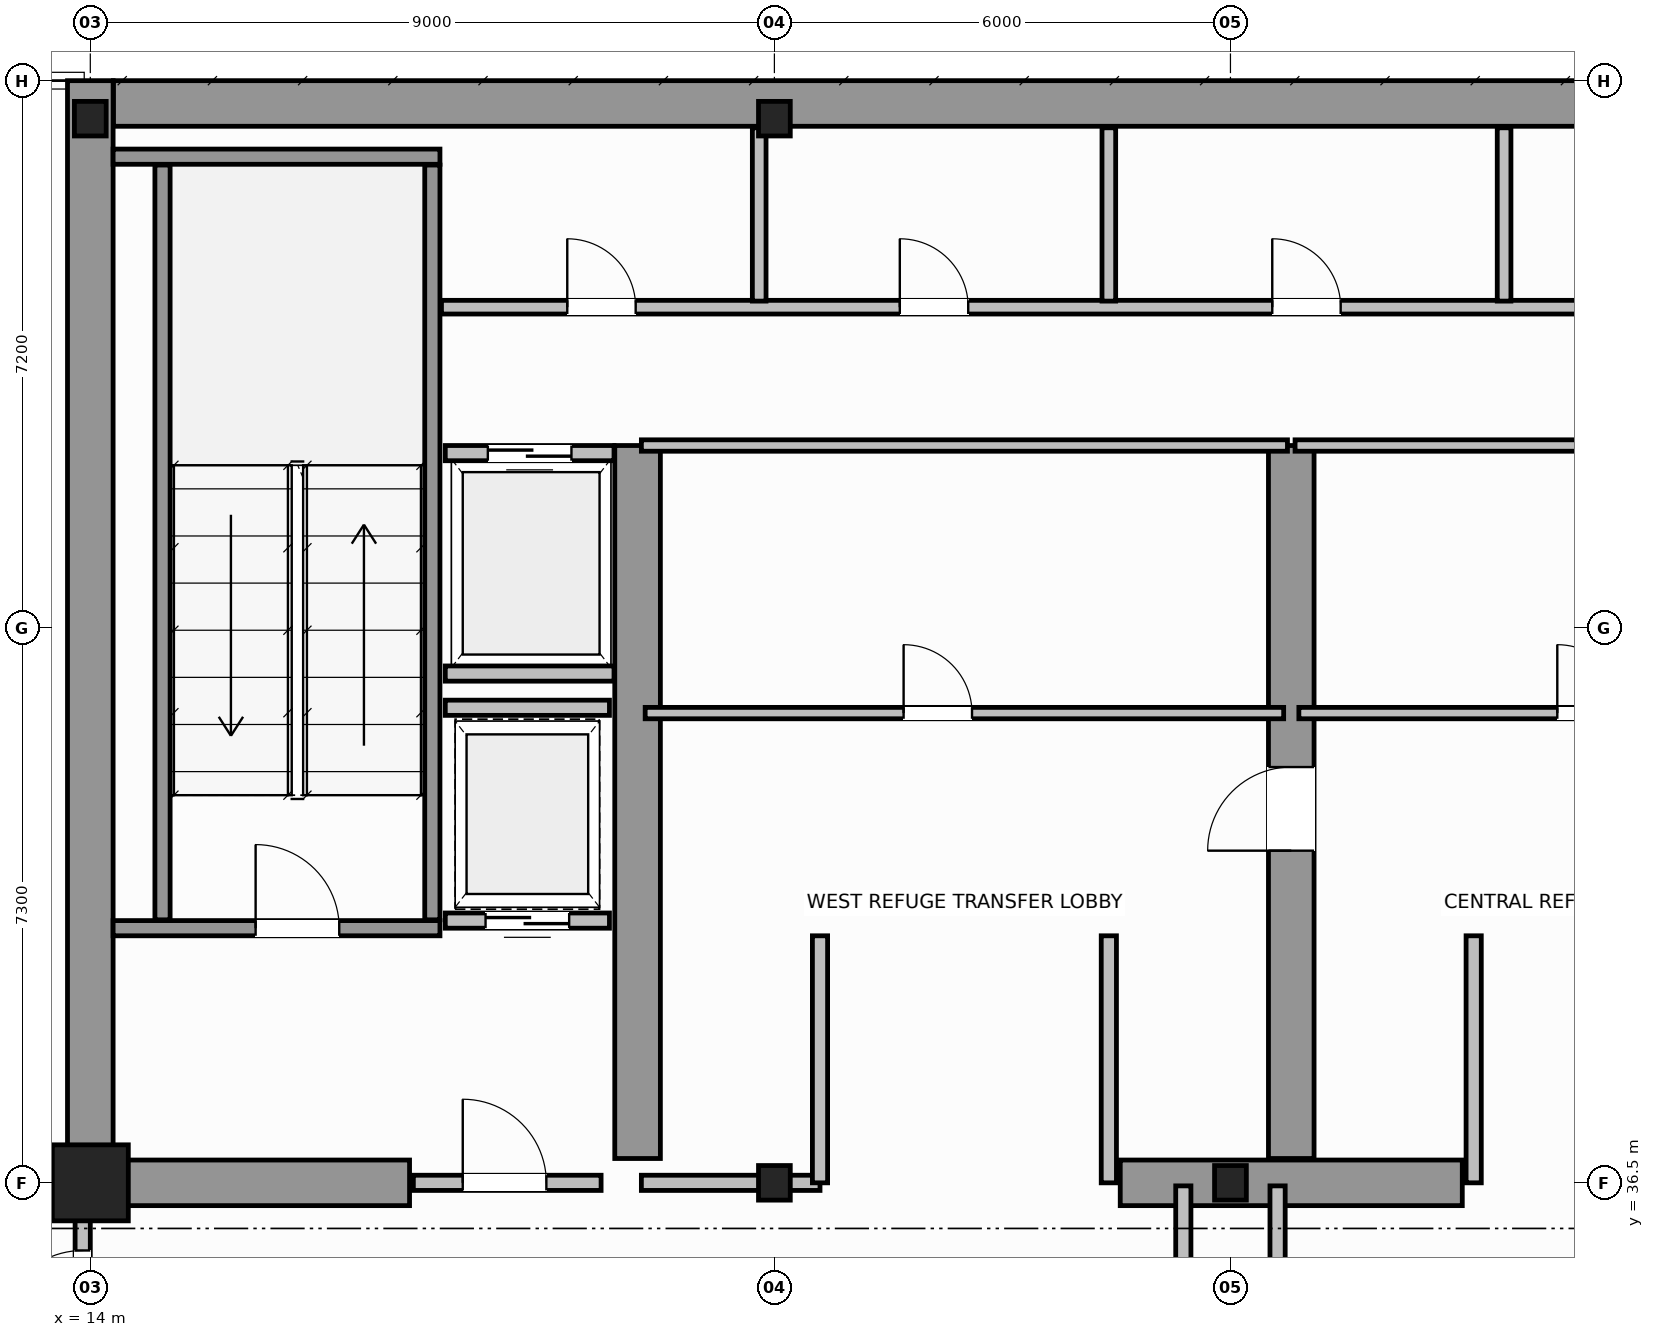
"""IFC4 building model, lengths in metres.
Left out: names, types, materials, properties, quantities, classifications, styles, units other than length and angle.
Written with IfcOpenShell. Run it as: python <this file> out.ifc"""

import sys

from ifc_helpers import new_model, si_unit, direction, frame, frame_2d, origin, origin_2d, place, context, subcontext, project, spatial, rectangle, i_section, extrude, source, transform, mapped, element, fill, save


model = new_model("IFC4")
c1 = context("Model", 3, precision=1e-05, world=origin(), true_north=direction((0.0, 1.0)))
c2 = subcontext(c1, "Body", "Model", "MODEL_VIEW")
j1 = project(units=[si_unit("LENGTHUNIT", "METRE"), si_unit("PLANEANGLEUNIT", "RADIAN")], contexts=[c1])
p1 = place(None, origin())
s1 = spatial("IfcSite", under=j1, at=p1, CompositionType="ELEMENT")
p2 = place(p1, origin())
s2 = spatial("IfcBuilding", under=s1, at=p2, CompositionType="ELEMENT")
p3 = place(p2, frame((0.0, 0.0, 218.4)))
s3 = spatial("IfcBuildingStorey", under=s2, at=p3, CompositionType="ELEMENT", Elevation=218.4)
m1 = source(origin(), c2, "Body", "SweptSolid", [
    extrude(rectangle(XDim=1.0, YDim=1.0, at=origin_2d()), origin(), (0.0, 0.0, 1.0), 4.8),
])
p4 = place(p3, frame((14.0, 36.5, 0.0), z_axis=(0.0, 0.0, 1.0), x_axis=(1.0, 0.0, 0.0)))
e1 = element("IfcColumn", 1, at=p4, inside=s3, PredefinedType="COLUMN", context=c2, shape_type="MappedRepresentation", body=[
    mapped(m1, transform((0.0, 0.0, 0.0), scale=1.0)),
])
m2 = source(origin(), c2, "Body", "SweptSolid", [
    extrude(i_section(OverallWidth=0.418, OverallDepth=0.455, WebThickness=0.042, FlangeThickness=0.058, FilletRadius=0.015, at=origin_2d()), origin(), (0.0, 0.0, 1.0), 4.8),
])
for number, where, z_axis, x_axis in (
    (2, (23.0, 36.5, 0.0), (0.0, 0.0, 1.0), (1.0, 0.0, 0.0)),
    (3, (29.0, 36.5, 0.0), (0.0, 0.0, 1.0), (1.0, 0.0, 0.0)),
    (4, (14.0, 50.5, 0.0), (0.0, 0.0, 1.0), (1.0, 0.0, 0.0)),
    (5, (23.0, 50.5, 0.0), (0.0, 0.0, 1.0), (1.0, 0.0, 0.0)),
):
    element("IfcColumn", number, at=place(p3, frame(where, z_axis=z_axis, x_axis=x_axis)), inside=s3, PredefinedType="COLUMN", context=c2, shape_type="MappedRepresentation", body=[
        mapped(m2, transform((0.0, 0.0, 0.0), scale=1.0)),
    ])
p5 = place(p3, frame((14.304, 50.7, 0.0), z_axis=(0.0, 0.0, 1.0), x_axis=(1.0, 0.0, 0.0)))
e6 = element("IfcWall", 6, at=p5, inside=s3, PredefinedType="SHEAR", context=c2, shape_type="SweptSolid", body=[
    extrude(rectangle(XDim=19.694, YDim=0.6, at=frame_2d((9.847, 0.0))), origin(), (0.0, 0.0, 1.0), 4.8),
])
p6 = place(p3, frame((14.0, 36.5, 0.0), z_axis=(0.0, 0.0, 1.0), x_axis=(0.0, 1.0, 0.0)))
e7 = element("IfcWall", 7, at=p6, inside=s3, PredefinedType="SHEAR", context=c2, shape_type="SweptSolid", body=[
    extrude(rectangle(XDim=14.5, YDim=0.6, at=frame_2d((7.25, 0.0))), origin(), (0.0, 0.0, 1.0), 4.8),
])
p7 = place(p3, frame((14.32, 36.5, 0.0), z_axis=(0.0, 0.0, 1.0), x_axis=(1.0, 0.0, 0.0)))
e8 = element("IfcWall", 8, at=p7, inside=s3, PredefinedType="SHEAR", context=c2, shape_type="SweptSolid", body=[
    extrude(rectangle(XDim=3.88, YDim=0.6, at=frame_2d((1.94, 0.0))), origin(), (0.0, 0.0, 1.0), 3.54),
])
p8 = place(p3, frame((27.55, 36.5, 0.0), z_axis=(0.0, 0.0, 1.0), x_axis=(1.0, 0.0, 0.0)))
e9 = element("IfcWall", 9, at=p8, inside=s3, PredefinedType="SHEAR", context=c2, shape_type="SweptSolid", body=[
    extrude(rectangle(XDim=4.5, YDim=0.6, at=frame_2d((2.25, 0.0))), origin(), (0.0, 0.0, 1.0), 4.8),
])
p9 = place(p3, frame((21.2, 36.82, 0.0), z_axis=(0.0, 0.0, 1.0), x_axis=(0.0, 1.0, 0.0)))
e10 = element("IfcWall", 10, at=p9, inside=s3, PredefinedType="SHEAR", context=c2, shape_type="SweptSolid", body=[
    extrude(rectangle(XDim=9.38, YDim=0.6, at=frame_2d((4.69, 0.0))), origin(), (0.0, 0.0, 1.0), 4.8),
])
p10 = place(p3, frame((29.8, 36.82, 0.0), z_axis=(0.0, 0.0, 1.0), x_axis=(0.0, 1.0, 0.0)))
e11 = element("IfcWall", 11, at=p10, inside=s3, PredefinedType="SHEAR", context=c2, shape_type="SweptSolid", body=[
    extrude(rectangle(XDim=9.38, YDim=0.6, at=frame_2d((4.69, 0.0))), origin(), (0.0, 0.0, 1.0), 4.8),
])
p11 = place(p10, frame((4.05, 0.0, 0.0)))
e12 = element("IfcOpeningElement", 12, at=p11, cuts=e11, PredefinedType="OPENING", context=c2, shape_type="SweptSolid", body=[
    extrude(rectangle(XDim=1.1, YDim=2.15, at=frame_2d((0.55, 1.075))), frame((0.0, 0.31, 0.0), z_axis=(0.0, -1.0, 0.0), x_axis=(1.0, 0.0, 0.0)), (0.0, 0.0, 1.0), 0.62),
])
p12 = place(p3, frame((14.3, 39.85, 0.0), z_axis=(0.0, 0.0, 1.0), x_axis=(1.0, 0.0, 0.0)))
e13 = element("IfcWall", 13, at=p12, inside=s3, PredefinedType="SOLIDWALL", context=c2, shape_type="SweptSolid", body=[
    extrude(rectangle(XDim=4.3, YDim=0.2, at=frame_2d((2.15, 0.0))), origin(), (0.0, 0.0, 1.0), 4.8),
])
p13 = place(p12, frame((1.875, 0.0, 0.0)))
e14 = element("IfcOpeningElement", 14, at=p13, cuts=e13, PredefinedType="OPENING", context=c2, shape_type="SweptSolid", body=[
    extrude(rectangle(XDim=1.1, YDim=2.15, at=frame_2d((0.55, 1.075))), frame((0.0, 0.11, 0.0), z_axis=(0.0, -1.0, 0.0), x_axis=(1.0, 0.0, 0.0)), (0.0, 0.0, 1.0), 0.22),
])
p14 = place(p3, frame((14.3, 50.0, 0.0), z_axis=(0.0, 0.0, 1.0), x_axis=(1.0, 0.0, 0.0)))
e15 = element("IfcWall", 15, at=p14, inside=s3, PredefinedType="SOLIDWALL", context=c2, shape_type="SweptSolid", body=[
    extrude(rectangle(XDim=4.3, YDim=0.2, at=frame_2d((2.15, 0.0))), origin(), (0.0, 0.0, 1.0), 4.8),
])
for number, where, z_axis, x_axis in (
    (16, (14.95, 39.96, 0.0), (0.0, 0.0, 1.0), (0.0, 1.0, 0.0)),
    (17, (18.5, 39.96, 0.0), (0.0, 0.0, 1.0), (0.0, 1.0, 0.0)),
):
    element("IfcWall", number, at=place(p3, frame(where, z_axis=z_axis, x_axis=x_axis)), inside=s3, PredefinedType="SOLIDWALL", context=c2, shape_type="SweptSolid", body=[
        extrude(rectangle(XDim=9.93, YDim=0.2, at=frame_2d((4.965, 0.0))), origin(), (0.0, 0.0, 1.0), 4.8),
    ])
p15 = place(p3, frame((18.25, 36.5, 0.0), z_axis=(0.0, 0.0, 1.0), x_axis=(1.0, 0.0, 0.0)))
e18 = element("IfcWall", 18, at=p15, inside=s3, PredefinedType="SOLIDWALL", context=c2, shape_type="SweptSolid", body=[
    extrude(rectangle(XDim=2.47, YDim=0.2, at=frame_2d((1.235, 0.0))), origin(), (0.0, 0.0, 1.0), 3.53),
])
p16 = place(p15, frame((0.65, 0.0, 0.0)))
e19 = element("IfcOpeningElement", 19, at=p16, cuts=e18, PredefinedType="OPENING", context=c2, shape_type="SweptSolid", body=[
    extrude(rectangle(XDim=1.1, YDim=2.15, at=frame_2d((0.55, 1.075))), frame((0.0, 0.11, 0.0), z_axis=(0.0, -1.0, 0.0), x_axis=(1.0, 0.0, 0.0)), (0.0, 0.0, 1.0), 0.22),
])
p17 = place(p3, frame((18.67, 46.1, 0.0), z_axis=(0.0, 0.0, 1.0), x_axis=(1.0, 0.0, 0.0)))
e20 = element("IfcWall", 20, at=p17, inside=s3, PredefinedType="SOLIDWALL", context=c2, shape_type="SweptSolid", body=[
    extrude(rectangle(XDim=2.22, YDim=0.2, at=frame_2d((1.11, 0.0))), origin(), (0.0, 0.0, 1.0), 4.54),
])
p18 = place(p17, frame((0.56, 0.0, 0.0)))
e21 = element("IfcOpeningElement", 21, at=p18, cuts=e20, PredefinedType="OPENING", context=c2, shape_type="SweptSolid", body=[
    extrude(rectangle(XDim=1.1, YDim=2.15, at=frame_2d((0.55, 1.075))), frame((0.0, 0.11, 0.0), z_axis=(0.0, -1.0, 0.0), x_axis=(1.0, 0.0, 0.0)), (0.0, 0.0, 1.0), 0.22),
])
p19 = place(p3, frame((18.67, 43.2, 0.0), z_axis=(0.0, 0.0, 1.0), x_axis=(1.0, 0.0, 0.0)))
e22 = element("IfcWall", 22, at=p19, inside=s3, PredefinedType="SOLIDWALL", context=c2, shape_type="SweptSolid", body=[
    extrude(rectangle(XDim=2.22, YDim=0.2, at=frame_2d((1.11, 0.0))), origin(), (0.0, 0.0, 1.0), 4.54),
])
p20 = place(p3, frame((18.67, 39.95, 0.0), z_axis=(0.0, 0.0, 1.0), x_axis=(1.0, 0.0, 0.0)))
e23 = element("IfcWall", 23, at=p20, inside=s3, PredefinedType="SOLIDWALL", context=c2, shape_type="SweptSolid", body=[
    extrude(rectangle(XDim=2.16, YDim=0.2, at=frame_2d((1.08, 0.0))), origin(), (0.0, 0.0, 1.0), 4.54),
])
p21 = place(p20, frame((0.53, 0.0, 0.0)))
e24 = element("IfcOpeningElement", 24, at=p21, cuts=e23, PredefinedType="OPENING", context=c2, shape_type="SweptSolid", body=[
    extrude(rectangle(XDim=1.1, YDim=2.15, at=frame_2d((0.55, 1.075))), frame((0.0, 0.11, 0.0), z_axis=(0.0, -1.0, 0.0), x_axis=(1.0, 0.0, 0.0)), (0.0, 0.0, 1.0), 0.22),
])
p22 = place(p3, frame((18.67, 42.75, 0.0), z_axis=(0.0, 0.0, 1.0), x_axis=(1.0, 0.0, 0.0)))
e25 = element("IfcWall", 25, at=p22, inside=s3, PredefinedType="SOLIDWALL", context=c2, shape_type="SweptSolid", body=[
    extrude(rectangle(XDim=2.16, YDim=0.2, at=frame_2d((1.08, 0.0))), origin(), (0.0, 0.0, 1.0), 4.54),
])
p23 = place(p3, frame((21.25, 36.5, 0.0), z_axis=(0.0, 0.0, 1.0), x_axis=(1.0, 0.0, 0.0)))
e26 = element("IfcWall", 26, at=p23, inside=s3, PredefinedType="SOLIDWALL", context=c2, shape_type="SweptSolid", body=[
    extrude(rectangle(XDim=2.35, YDim=0.2, at=frame_2d((1.175, 0.0))), origin(), (0.0, 0.0, 1.0), 3.53),
])
for number, where, z_axis, x_axis in (
    (27, (23.6, 36.5, 0.0), (0.0, 0.0, 1.0), (0.0, 1.0, 0.0)),
    (28, (27.4, 36.5, 0.0), (0.0, 0.0, 1.0), (0.0, 1.0, 0.0)),
):
    element("IfcWall", number, at=place(p3, frame(where, z_axis=z_axis, x_axis=x_axis)), inside=s3, PredefinedType="SOLIDWALL", context=c2, shape_type="SweptSolid", body=[
        extrude(rectangle(XDim=3.25, YDim=0.2, at=frame_2d((1.625, 0.0))), origin(), (0.0, 0.0, 1.0), 4.54),
    ])
p24 = place(p3, frame((21.25, 46.2, 0.0), z_axis=(0.0, 0.0, 1.0), x_axis=(1.0, 0.0, 0.0)))
e29 = element("IfcWall", 29, at=p24, inside=s3, PredefinedType="PARTITIONING", context=c2, shape_type="SweptSolid", body=[
    extrude(rectangle(XDim=8.5, YDim=0.15, at=frame_2d((4.25, 0.0))), origin(), (0.0, 0.0, 1.0), 4.54),
])
p25 = place(p3, frame((21.3, 42.68, 0.0), z_axis=(0.0, 0.0, 1.0), x_axis=(1.0, 0.0, 0.0)))
e30 = element("IfcWall", 30, at=p25, inside=s3, PredefinedType="PARTITIONING", context=c2, shape_type="SweptSolid", body=[
    extrude(rectangle(XDim=8.4, YDim=0.15, at=frame_2d((4.2, 0.0))), origin(), (0.0, 0.0, 1.0), 4.54),
])
p26 = place(p25, frame((3.4, 0.0, 0.0)))
e31 = element("IfcOpeningElement", 31, at=p26, cuts=e30, PredefinedType="OPENING", context=c2, shape_type="SweptSolid", body=[
    extrude(rectangle(XDim=0.9, YDim=2.1, at=frame_2d((0.45, 1.05))), frame((0.0, 0.085, 0.0), z_axis=(0.0, -1.0, 0.0), x_axis=(1.0, 0.0, 0.0)), (0.0, 0.0, 1.0), 0.17),
])
p27 = place(p3, frame((32.2, 36.5, 0.0), z_axis=(0.0, 0.0, 1.0), x_axis=(0.0, 1.0, 0.0)))
e32 = element("IfcWall", 32, at=p27, inside=s3, PredefinedType="SOLIDWALL", context=c2, shape_type="SweptSolid", body=[
    extrude(rectangle(XDim=3.25, YDim=0.2, at=frame_2d((1.625, 0.0))), origin(), (0.0, 0.0, 1.0), 4.54),
])
p28 = place(p3, frame((29.85, 46.2, 0.0), z_axis=(0.0, 0.0, 1.0), x_axis=(1.0, 0.0, 0.0)))
e33 = element("IfcWall", 33, at=p28, inside=s3, PredefinedType="PARTITIONING", context=c2, shape_type="SweptSolid", body=[
    extrude(rectangle(XDim=8.5, YDim=0.15, at=frame_2d((4.25, 0.0))), origin(), (0.0, 0.0, 1.0), 4.54),
])
p29 = place(p3, frame((29.9, 42.68, 0.0), z_axis=(0.0, 0.0, 1.0), x_axis=(1.0, 0.0, 0.0)))
e34 = element("IfcWall", 34, at=p29, inside=s3, PredefinedType="PARTITIONING", context=c2, shape_type="SweptSolid", body=[
    extrude(rectangle(XDim=8.4, YDim=0.15, at=frame_2d((4.2, 0.0))), origin(), (0.0, 0.0, 1.0), 4.54),
])
p30 = place(p29, frame((3.4, 0.0, 0.0)))
e35 = element("IfcOpeningElement", 35, at=p30, cuts=e34, PredefinedType="OPENING", context=c2, shape_type="SweptSolid", body=[
    extrude(rectangle(XDim=0.9, YDim=2.1, at=frame_2d((0.45, 1.05))), frame((0.0, 0.085, 0.0), z_axis=(0.0, -1.0, 0.0), x_axis=(1.0, 0.0, 0.0)), (0.0, 0.0, 1.0), 0.17),
])
p31 = place(p3, frame((18.62, 48.02, 0.0), z_axis=(0.0, 0.0, 1.0), x_axis=(1.0, 0.0, 0.0)))
e36 = element("IfcWall", 36, at=p31, inside=s3, PredefinedType="PLUMBINGWALL", context=c2, shape_type="SweptSolid", body=[
    extrude(rectangle(XDim=30.76, YDim=0.18, at=frame_2d((15.38, 0.0))), origin(), (0.0, 0.0, 1.0), 4.54),
])
p32 = place(p31, frame((1.655, 0.0, 0.0)))
e37 = element("IfcOpeningElement", 37, at=p32, cuts=e36, PredefinedType="OPENING", context=c2, shape_type="SweptSolid", body=[
    extrude(rectangle(XDim=0.9, YDim=2.15, at=frame_2d((0.45, 1.075))), frame((0.0, 0.1, 0.0), z_axis=(0.0, -1.0, 0.0), x_axis=(1.0, 0.0, 0.0)), (0.0, 0.0, 1.0), 0.2),
])
p33 = place(p31, frame((6.03, 0.0, 0.0)))
e38 = element("IfcOpeningElement", 38, at=p33, cuts=e36, PredefinedType="OPENING", context=c2, shape_type="SweptSolid", body=[
    extrude(rectangle(XDim=0.9, YDim=2.15, at=frame_2d((0.45, 1.075))), frame((0.0, 0.1, 0.0), z_axis=(0.0, -1.0, 0.0), x_axis=(1.0, 0.0, 0.0)), (0.0, 0.0, 1.0), 0.2),
])
p34 = place(p31, frame((10.93, 0.0, 0.0)))
e39 = element("IfcOpeningElement", 39, at=p34, cuts=e36, PredefinedType="OPENING", context=c2, shape_type="SweptSolid", body=[
    extrude(rectangle(XDim=0.9, YDim=2.15, at=frame_2d((0.45, 1.075))), frame((0.0, 0.1, 0.0), z_axis=(0.0, -1.0, 0.0), x_axis=(1.0, 0.0, 0.0)), (0.0, 0.0, 1.0), 0.2),
])
p35 = place(p31, frame((16.13, 0.0, 0.0)))
e40 = element("IfcOpeningElement", 40, at=p35, cuts=e36, PredefinedType="OPENING", context=c2, shape_type="SweptSolid", body=[
    extrude(rectangle(XDim=0.9, YDim=2.15, at=frame_2d((0.45, 1.075))), frame((0.0, 0.1, 0.0), z_axis=(0.0, -1.0, 0.0), x_axis=(1.0, 0.0, 0.0)), (0.0, 0.0, 1.0), 0.2),
])
p36 = place(p31, frame((21.73, 0.0, 0.0)))
e41 = element("IfcOpeningElement", 41, at=p36, cuts=e36, PredefinedType="OPENING", context=c2, shape_type="SweptSolid", body=[
    extrude(rectangle(XDim=0.9, YDim=2.15, at=frame_2d((0.45, 1.075))), frame((0.0, 0.1, 0.0), z_axis=(0.0, -1.0, 0.0), x_axis=(1.0, 0.0, 0.0)), (0.0, 0.0, 1.0), 0.2),
])
p37 = place(p31, frame((27.505, 0.0, 0.0)))
e42 = element("IfcOpeningElement", 42, at=p37, cuts=e36, PredefinedType="OPENING", context=c2, shape_type="SweptSolid", body=[
    extrude(rectangle(XDim=0.9, YDim=2.15, at=frame_2d((0.45, 1.075))), frame((0.0, 0.1, 0.0), z_axis=(0.0, -1.0, 0.0), x_axis=(1.0, 0.0, 0.0)), (0.0, 0.0, 1.0), 0.2),
])
p38 = place(p3, frame((22.8, 48.1, 0.0), z_axis=(0.0, 0.0, 1.0), x_axis=(0.0, 1.0, 0.0)))
e43 = element("IfcWall", 43, at=p38, inside=s3, PredefinedType="PLUMBINGWALL", context=c2, shape_type="SweptSolid", body=[
    extrude(rectangle(XDim=2.28, YDim=0.18, at=frame_2d((1.14, 0.0))), origin(), (0.0, 0.0, 1.0), 3.93),
])
for number, where, z_axis, x_axis in (
    (44, (27.4, 48.1, 0.0), (0.0, 0.0, 1.0), (0.0, 1.0, 0.0)),
    (45, (32.6, 48.1, 0.0), (0.0, 0.0, 1.0), (0.0, 1.0, 0.0)),
):
    element("IfcWall", number, at=place(p3, frame(where, z_axis=z_axis, x_axis=x_axis)), inside=s3, PredefinedType="PLUMBINGWALL", context=c2, shape_type="SweptSolid", body=[
        extrude(rectangle(XDim=2.28, YDim=0.18, at=frame_2d((1.14, 0.0))), origin(), (0.0, 0.0, 1.0), 4.54),
    ])
p39 = place(p3, frame((13.9, 33.86, 0.0), z_axis=(0.0, 0.0, 1.0), x_axis=(0.0, 1.0, 0.0)))
e46 = element("IfcWall", 46, at=p39, inside=s3, PredefinedType="SOLIDWALL", context=c2, shape_type="SweptSolid", body=[
    extrude(rectangle(XDim=2.58, YDim=0.2, at=frame_2d((1.29, 0.0))), origin(), (0.0, 0.0, 1.0), 4.54),
])
p40 = place(p39, frame((0.65, 0.0, 0.0)))
e47 = element("IfcOpeningElement", 47, at=p40, cuts=e46, PredefinedType="OPENING", context=c2, shape_type="SweptSolid", body=[
    extrude(rectangle(XDim=1.1, YDim=2.15, at=frame_2d((0.55, 1.075))), frame((0.0, 0.11, 0.0), z_axis=(0.0, -1.0, 0.0), x_axis=(1.0, 0.0, 0.0)), (0.0, 0.0, 1.0), 0.22),
])
for number, where, z_axis, x_axis in (
    (48, (28.38, 28.16, 0.0), (0.0, 0.0, 1.0), (0.0, 1.0, 0.0)),
    (49, (29.62, 28.16, 0.0), (0.0, 0.0, 1.0), (0.0, 1.0, 0.0)),
):
    element("IfcWall", number, at=place(p3, frame(where, z_axis=z_axis, x_axis=x_axis)), inside=s3, PredefinedType="SOLIDWALL", context=c2, shape_type="SweptSolid", body=[
        extrude(rectangle(XDim=8.3, YDim=0.2, at=frame_2d((4.15, 0.0))), origin(), (0.0, 0.0, 1.0), 4.54),
    ])
m3 = source(origin(), c2, "Body", "SweptSolid", [
    extrude(rectangle(XDim=1.1, YDim=2.15, at=frame_2d((0.55, 1.075))), frame((0.0, 0.025, 0.0), z_axis=(0.0, -1.0, 0.0), x_axis=(1.0, 0.0, 0.0)), (0.0, 0.0, 1.0), 0.05),
])
p41 = place(p13, origin())
e50 = element("IfcDoor", 50, at=p41, inside=s3, OperationType="SINGLE_SWING_LEFT", PredefinedType="DOOR", context=c2, shape_type="MappedRepresentation", body=[
    mapped(m3, transform((0.0, 0.0, 0.0), scale=1.0)),
])
fill(e14, e50)
p42 = place(p16, origin())
e51 = element("IfcDoor", 51, at=p42, inside=s3, OperationType="SINGLE_SWING_RIGHT", PredefinedType="DOOR", context=c2, shape_type="MappedRepresentation", body=[
    mapped(m3, transform((0.0, 0.0, 0.0), scale=1.0)),
])
fill(e19, e51)
p43 = place(p18, origin())
e52 = element("IfcDoor", 52, at=p43, inside=s3, OperationType="DOUBLE_DOOR_SLIDING", PredefinedType="DOOR", context=c2, shape_type="MappedRepresentation", body=[
    mapped(m3, transform((0.0, 0.0, 0.0), scale=1.0)),
])
fill(e21, e52)
p44 = place(p21, origin())
e53 = element("IfcDoor", 53, at=p44, inside=s3, OperationType="DOUBLE_DOOR_SLIDING", PredefinedType="DOOR", context=c2, shape_type="MappedRepresentation", body=[
    mapped(m3, transform((0.0, 0.0, 0.0), scale=1.0)),
])
fill(e24, e53)
m4 = source(origin(), c2, "Body", "SweptSolid", [
    extrude(rectangle(XDim=0.9, YDim=2.1, at=frame_2d((0.45, 1.05))), frame((0.0, 0.025, 0.0), z_axis=(0.0, -1.0, 0.0), x_axis=(1.0, 0.0, 0.0)), (0.0, 0.0, 1.0), 0.05),
])
p45 = place(p26, origin())
e54 = element("IfcDoor", 54, at=p45, inside=s3, OperationType="SINGLE_SWING_RIGHT", PredefinedType="DOOR", context=c2, shape_type="MappedRepresentation", body=[
    mapped(m4, transform((0.0, 0.0, 0.0), scale=1.0)),
])
fill(e31, e54)
p46 = place(p30, origin())
e55 = element("IfcDoor", 55, at=p46, inside=s3, OperationType="SINGLE_SWING_RIGHT", PredefinedType="DOOR", context=c2, shape_type="MappedRepresentation", body=[
    mapped(m4, transform((0.0, 0.0, 0.0), scale=1.0)),
])
fill(e35, e55)
p47 = place(p11, origin())
e56 = element("IfcDoor", 56, at=p47, inside=s3, OperationType="SINGLE_SWING_LEFT", PredefinedType="DOOR", context=c2, shape_type="MappedRepresentation", body=[
    mapped(m3, transform((0.0, 0.0, 0.0), scale=1.0)),
])
fill(e12, e56)
m5 = source(origin(), c2, "Body", "SweptSolid", [
    extrude(rectangle(XDim=0.9, YDim=2.15, at=frame_2d((0.45, 1.075))), frame((0.0, 0.025, 0.0), z_axis=(0.0, -1.0, 0.0), x_axis=(1.0, 0.0, 0.0)), (0.0, 0.0, 1.0), 0.05),
])
p48 = place(p32, origin())
e57 = element("IfcDoor", 57, at=p48, inside=s3, OperationType="SINGLE_SWING_LEFT", PredefinedType="DOOR", context=c2, shape_type="MappedRepresentation", body=[
    mapped(m5, transform((0.0, 0.0, 0.0), scale=1.0)),
])
fill(e37, e57)
p49 = place(p33, origin())
e58 = element("IfcDoor", 58, at=p49, inside=s3, OperationType="SINGLE_SWING_RIGHT", PredefinedType="DOOR", context=c2, shape_type="MappedRepresentation", body=[
    mapped(m5, transform((0.0, 0.0, 0.0), scale=1.0)),
])
fill(e38, e58)
p50 = place(p34, origin())
e59 = element("IfcDoor", 59, at=p50, inside=s3, OperationType="SINGLE_SWING_LEFT", PredefinedType="DOOR", context=c2, shape_type="MappedRepresentation", body=[
    mapped(m5, transform((0.0, 0.0, 0.0), scale=1.0)),
])
fill(e39, e59)
p51 = place(p40, origin())
e60 = element("IfcDoor", 60, at=p51, inside=s3, OperationType="SINGLE_SWING_LEFT", PredefinedType="DOOR", context=c2, shape_type="MappedRepresentation", body=[
    mapped(m3, transform((0.0, 0.0, 0.0), scale=1.0)),
])
fill(e47, e60)
save(model, sys.argv[1])
